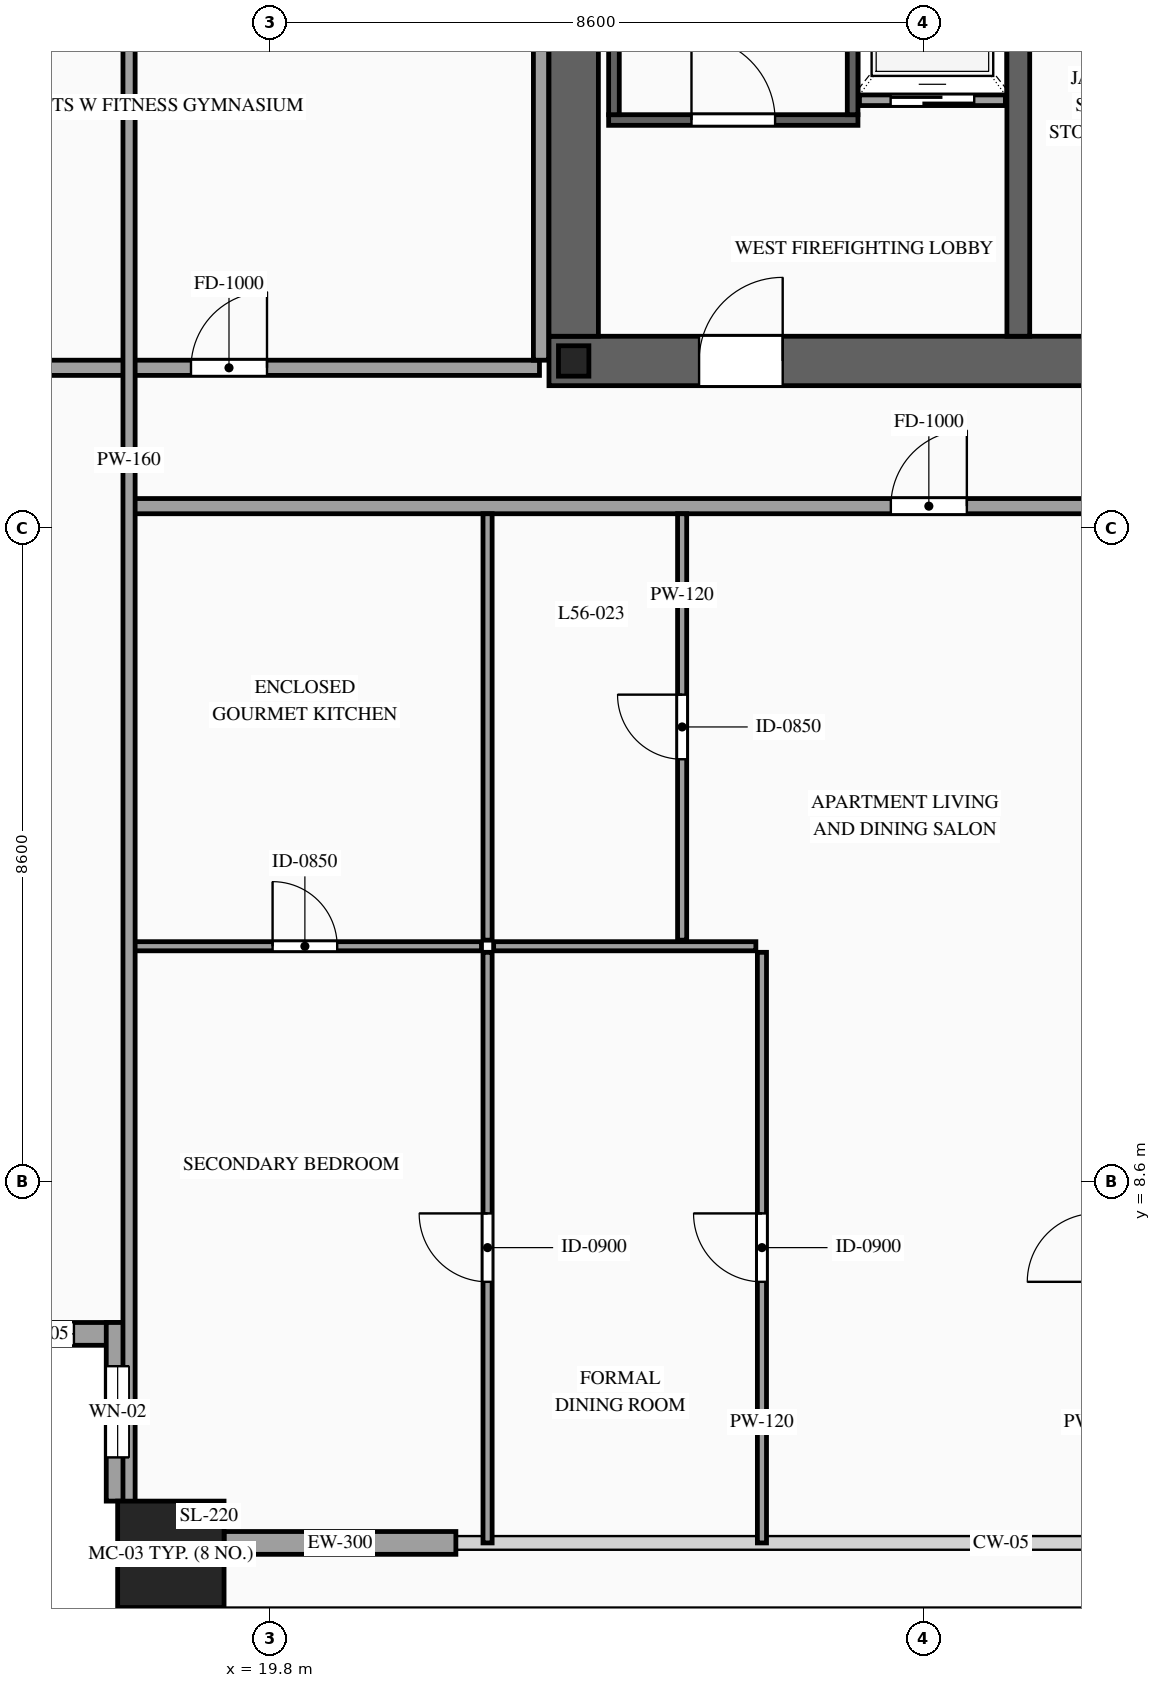
"""IFC4 building model, lengths in metres.
Left out: names, types, materials, properties, quantities, classifications, styles, units other than length and angle.
Written with IfcOpenShell. Run it as: python <this file> out.ifc"""

import sys

from ifc_helpers import new_model, si_unit, direction, frame, frame_2d, origin, origin_2d, place, context, subcontext, project, spatial, rectangle, hollow_rectangle, i_section, extrude, source, transform, mapped, element, fill, save


model = new_model("IFC4")
c1 = context("Model", 3, precision=1e-05, world=origin(), true_north=direction((0.0, 1.0)))
c2 = subcontext(c1, "Body", "Model", "MODEL_VIEW")
j1 = project(units=[si_unit("LENGTHUNIT", "METRE"), si_unit("PLANEANGLEUNIT", "RADIAN")], contexts=[c1])
p1 = place(None, origin())
s1 = spatial("IfcSite", under=j1, at=p1, CompositionType="ELEMENT")
p2 = place(p1, origin())
s2 = spatial("IfcBuilding", under=s1, at=p2, CompositionType="ELEMENT")
p3 = place(p2, frame((0.0, 0.0, 212.5)))
s3 = spatial("IfcBuildingStorey", under=s2, at=p3, CompositionType="ELEMENT", Elevation=212.5)
p4 = place(p3, frame((23.475, 19.4, 0.0), z_axis=(0.0, 0.0, 1.0), x_axis=(1.0, 0.0, 0.0)))
e1 = element("IfcWall", 1, at=p4, inside=s3, PredefinedType="SHEAR", context=c2, shape_type="SweptSolid", body=[
    extrude(rectangle(XDim=27.05, YDim=0.65, at=frame_2d((13.525, 0.0))), origin(), (0.0, 0.0, 1.0), 3.5),
])
p5 = place(p4, frame((1.975, 0.0, 0.0)))
e2 = element("IfcOpeningElement", 2, at=p5, cuts=e1, PredefinedType="OPENING", context=c2, shape_type="SweptSolid", body=[
    extrude(rectangle(XDim=1.1, YDim=2.2, at=frame_2d((0.55, 1.1))), frame((0.0, 0.34, 0.0), z_axis=(0.0, -1.0, 0.0), x_axis=(1.0, 0.0, 0.0)), (0.0, 0.0, 1.0), 0.68),
])
p6 = place(p4, frame((9.875, 0.0, 0.0)))
e3 = element("IfcOpeningElement", 3, at=p6, cuts=e1, PredefinedType="OPENING", context=c2, shape_type="SweptSolid", body=[
    extrude(rectangle(XDim=1.1, YDim=2.2, at=frame_2d((0.55, 1.1))), frame((0.0, 0.34, 0.0), z_axis=(0.0, -1.0, 0.0), x_axis=(1.0, 0.0, 0.0)), (0.0, 0.0, 1.0), 0.68),
])
p7 = place(p4, frame((23.075, 0.0, 0.0)))
e4 = element("IfcOpeningElement", 4, at=p7, cuts=e1, PredefinedType="OPENING", context=c2, shape_type="SweptSolid", body=[
    extrude(rectangle(XDim=1.1, YDim=2.2, at=frame_2d((0.55, 1.1))), frame((0.0, 0.34, 0.0), z_axis=(0.0, -1.0, 0.0), x_axis=(1.0, 0.0, 0.0)), (0.0, 0.0, 1.0), 0.68),
])
p8 = place(p4, frame((19.695, 0.0, 0.0)))
e5 = element("IfcOpeningElement", 5, at=p8, cuts=e1, PredefinedType="OPENING", context=c2, shape_type="SweptSolid", body=[
    extrude(rectangle(XDim=0.9, YDim=2.15, at=frame_2d((0.45, 1.075))), frame((0.0, 0.34, 0.0), z_axis=(0.0, -1.0, 0.0), x_axis=(1.0, 0.0, 0.0)), (0.0, 0.0, 1.0), 0.68),
])
p9 = place(p4, frame((18.255, 0.0, 0.0)))
e6 = element("IfcOpeningElement", 6, at=p9, cuts=e1, PredefinedType="OPENING", context=c2, shape_type="SweptSolid", body=[
    extrude(rectangle(XDim=0.9, YDim=2.15, at=frame_2d((0.45, 1.075))), frame((0.0, 0.34, 0.0), z_axis=(0.0, -1.0, 0.0), x_axis=(1.0, 0.0, 0.0)), (0.0, 0.0, 1.0), 0.68),
])
m1 = source(origin(), c2, "Body", "SweptSolid", [
    extrude(rectangle(XDim=12.15, YDim=0.65, at=frame_2d((6.075, 0.0))), origin(), (0.0, 0.0, 1.0), 3.5),
])
p10 = place(p3, frame((23.8, 19.725, 0.0), z_axis=(0.0, 0.0, 1.0), x_axis=(0.0, 1.0, 0.0)))
e7 = element("IfcWall", 7, at=p10, inside=s3, PredefinedType="SHEAR", context=c2, shape_type="MappedRepresentation", body=[
    mapped(m1, transform((0.0, 0.0, 0.0), scale=1.0)),
])
m2 = source(origin(), c2, "Body", "SweptSolid", [
    extrude(rectangle(XDim=12.15, YDim=0.3, at=frame_2d((6.075, 0.0))), origin(), (0.0, 0.0, 1.0), 3.5),
])
p11 = place(p3, frame((29.65, 19.725, 0.0), z_axis=(0.0, 0.0, 1.0), x_axis=(0.0, 1.0, 0.0)))
e8 = element("IfcWall", 8, at=p11, inside=s3, PredefinedType="SOLIDWALL", context=c2, shape_type="MappedRepresentation", body=[
    mapped(m2, transform((0.0, 0.0, 0.0), scale=1.0)),
])
m3 = source(origin(), c2, "Body", "SweptSolid", [
    extrude(i_section(OverallWidth=0.4, OverallDepth=0.4, WebThickness=0.013, FlangeThickness=0.021, at=origin_2d()), origin(), (0.0, 0.0, 1.0), 3.5),
])
p12 = place(p3, frame((23.8, 19.4, 0.0), z_axis=(0.0, 0.0, 1.0), x_axis=(1.0, 0.0, 0.0)))
e9 = element("IfcColumn", 9, at=p12, inside=s3, PredefinedType="COLUMN", context=c2, shape_type="MappedRepresentation", body=[
    mapped(m3, transform((0.0, 0.0, 0.0), scale=1.0)),
])
m4 = source(origin(), c2, "Body", "SweptSolid", [
    extrude(hollow_rectangle(XDim=1.4, YDim=1.4, WallThickness=0.06, at=origin_2d()), origin(), (0.0, 0.0, 1.0), 3.5),
])
p13 = place(p3, frame((18.5, 3.7, 0.0), z_axis=(0.0, 0.0, 1.0), x_axis=(1.0, 0.0, 0.0)))
e10 = element("IfcColumn", 10, at=p13, inside=s3, PredefinedType="COLUMN", context=c2, shape_type="MappedRepresentation", body=[
    mapped(m4, transform((0.0, 0.0, 0.0), scale=1.0)),
])
p14 = place(p3, frame((15.6, 6.6, 0.0), z_axis=(0.0, 0.0, 1.0), x_axis=(1.0, 0.0, 0.0)))
e11 = element("IfcWall", 11, at=p14, inside=s3, PredefinedType="SOLIDWALL", context=c2, shape_type="SweptSolid", body=[
    extrude(rectangle(XDim=2.35, YDim=0.3, at=frame_2d((1.175, 0.0))), origin(), (0.0, 0.0, 1.0), 3.28),
])
p15 = place(p14, frame((0.725, 0.0, 0.85)))
e12 = element("IfcOpeningElement", 12, at=p15, cuts=e11, PredefinedType="OPENING", context=c2, shape_type="SweptSolid", body=[
    extrude(rectangle(XDim=0.9, YDim=1.5, at=frame_2d((0.45, 0.75))), frame((0.0, 0.165, 0.0), z_axis=(0.0, -1.0, 0.0), x_axis=(1.0, 0.0, 0.0)), (0.0, 0.0, 1.0), 0.33),
])
p16 = place(p3, frame((17.8, 6.75, 0.0), z_axis=(0.0, 0.0, 1.0), x_axis=(0.0, -1.0, 0.0)))
e13 = element("IfcWall", 13, at=p16, inside=s3, PredefinedType="SOLIDWALL", context=c2, shape_type="SweptSolid", body=[
    extrude(rectangle(XDim=2.35, YDim=0.3, at=frame_2d((1.175, 0.0))), origin(), (0.0, 0.0, 1.0), 3.28),
])
p17 = place(p16, frame((0.575, 0.0, 0.85)))
e14 = element("IfcOpeningElement", 14, at=p17, cuts=e13, PredefinedType="OPENING", context=c2, shape_type="SweptSolid", body=[
    extrude(rectangle(XDim=1.2, YDim=2.1, at=frame_2d((0.6, 1.05))), frame((0.0, 0.165, 0.0), z_axis=(0.0, -1.0, 0.0), x_axis=(1.0, 0.0, 0.0)), (0.0, 0.0, 1.0), 0.33),
])
m5 = source(origin(), c2, "Body", "SweptSolid", [
    extrude(rectangle(XDim=3.05, YDim=0.3, at=frame_2d((1.525, 0.0))), origin(), (0.0, 0.0, 1.0), 2.835),
])
p18 = place(p3, frame((19.2, 3.85, 0.0), z_axis=(0.0, 0.0, 1.0), x_axis=(1.0, 0.0, 0.0)))
e15 = element("IfcWall", 15, at=p18, inside=s3, PredefinedType="SOLIDWALL", context=c2, shape_type="MappedRepresentation", body=[
    mapped(m5, transform((0.0, 0.0, 0.0), scale=1.0)),
])
p19 = place(p3, frame((27.56, 22.83, 0.0), z_axis=(0.0, 0.0, 1.0), x_axis=(1.0, 0.0, 0.0)))
e16 = element("IfcWall", 16, at=p19, inside=s3, PredefinedType="SOLIDWALL", context=c2, shape_type="SweptSolid", body=[
    extrude(rectangle(XDim=1.92, YDim=0.14, at=frame_2d((0.96, 0.0))), origin(), (0.0, 0.0, 1.0), 3.28),
])
p20 = place(p19, frame((0.41, 0.0, 0.0)))
e17 = element("IfcOpeningElement", 17, at=p20, cuts=e16, PredefinedType="OPENING", context=c2, shape_type="SweptSolid", body=[
    extrude(rectangle(XDim=1.1, YDim=2.2, at=frame_2d((0.55, 1.1))), frame((0.0, 0.085, 0.0), z_axis=(0.0, -1.0, 0.0), x_axis=(1.0, 0.0, 0.0)), (0.0, 0.0, 1.0), 0.17),
])
p21 = place(p3, frame((24.26, 22.57, 0.0), z_axis=(0.0, 0.0, 1.0), x_axis=(1.0, 0.0, 0.0)))
e18 = element("IfcWall", 18, at=p21, inside=s3, PredefinedType="SOLIDWALL", context=c2, shape_type="SweptSolid", body=[
    extrude(rectangle(XDim=3.28, YDim=0.14, at=frame_2d((1.64, 0.0))), origin(), (0.0, 0.0, 1.0), 3.28),
])
p22 = place(p21, frame((1.09, 0.0, 0.0)))
e19 = element("IfcOpeningElement", 19, at=p22, cuts=e18, PredefinedType="OPENING", context=c2, shape_type="SweptSolid", body=[
    extrude(rectangle(XDim=1.1, YDim=2.2, at=frame_2d((0.55, 1.1))), frame((0.0, 0.085, 0.0), z_axis=(0.0, -1.0, 0.0), x_axis=(1.0, 0.0, 0.0)), (0.0, 0.0, 1.0), 0.17),
])
m6 = source(origin(), c2, "Body", "SweptSolid", [
    extrude(rectangle(XDim=8.94, YDim=0.14, at=frame_2d((4.47, 0.0))), origin(), (0.0, 0.0, 1.0), 3.28),
])
for number, where, z_axis, x_axis in (
    (20, (24.33, 22.64, 0.0), (0.0, 0.0, 1.0), (0.0, 1.0, 0.0)),
    (21, (27.47, 22.64, 0.0), (0.0, 0.0, 1.0), (0.0, 1.0, 0.0)),
):
    element("IfcWall", number, at=place(p3, frame(where, z_axis=z_axis, x_axis=x_axis)), inside=s3, PredefinedType="SOLIDWALL", context=c2, shape_type="MappedRepresentation", body=[
        mapped(m6, transform((0.0, 0.0, 0.0), scale=1.0)),
    ])
p23 = place(p3, frame((17.94, 17.49, 0.0), z_axis=(0.0, 0.0, 1.0), x_axis=(1.0, 0.0, 0.0)))
e22 = element("IfcWall", 22, at=p23, inside=s3, PredefinedType="PARTITIONING", context=c2, shape_type="SweptSolid", body=[
    extrude(rectangle(XDim=17.455, YDim=0.2, at=frame_2d((8.728, 0.0))), origin(), (0.0, 0.0, 1.0), 3.28),
])
p24 = place(p23, frame((10.033, 0.0, 0.0)))
e23 = element("IfcOpeningElement", 23, at=p24, cuts=e22, PredefinedType="OPENING", context=c2, shape_type="SweptSolid", body=[
    extrude(rectangle(XDim=1.0, YDim=2.2, at=frame_2d((0.5, 1.1))), frame((0.0, 0.115, 0.0), z_axis=(0.0, -1.0, 0.0), x_axis=(1.0, 0.0, 0.0)), (0.0, 0.0, 1.0), 0.23),
])
p25 = place(p3, frame((17.94, 11.7, 0.0), z_axis=(0.0, 0.0, 1.0), x_axis=(1.0, 0.0, 0.0)))
e24 = element("IfcWall", 24, at=p25, inside=s3, PredefinedType="PARTITIONING", context=c2, shape_type="SweptSolid", body=[
    extrude(rectangle(XDim=4.647, YDim=0.12, at=frame_2d((2.323, 0.0))), origin(), (0.0, 0.0, 1.0), 3.28),
])
p26 = place(p25, frame((1.898, 0.0, 0.0)))
e25 = element("IfcOpeningElement", 25, at=p26, cuts=e24, PredefinedType="OPENING", context=c2, shape_type="SweptSolid", body=[
    extrude(rectangle(XDim=0.85, YDim=2.1, at=frame_2d((0.425, 1.05))), frame((0.0, 0.075, 0.0), z_axis=(0.0, -1.0, 0.0), x_axis=(1.0, 0.0, 0.0)), (0.0, 0.0, 1.0), 0.15),
])
m7 = source(origin(), c2, "Body", "SweptSolid", [
    extrude(rectangle(XDim=5.61, YDim=0.12, at=frame_2d((2.805, 0.0))), origin(), (0.0, 0.0, 1.0), 3.28),
])
p27 = place(p3, frame((22.667, 11.78, 0.0), z_axis=(0.0, 0.0, 1.0), x_axis=(0.0, 1.0, 0.0)))
e26 = element("IfcWall", 26, at=p27, inside=s3, PredefinedType="PARTITIONING", context=c2, shape_type="MappedRepresentation", body=[
    mapped(m7, transform((0.0, 0.0, 0.0), scale=1.0)),
])
p28 = place(p3, frame((25.227, 11.78, 0.0), z_axis=(0.0, 0.0, 1.0), x_axis=(0.0, 1.0, 0.0)))
e27 = element("IfcWall", 27, at=p28, inside=s3, PredefinedType="PARTITIONING", context=c2, shape_type="SweptSolid", body=[
    extrude(rectangle(XDim=5.61, YDim=0.12, at=frame_2d((2.805, 0.0))), origin(), (0.0, 0.0, 1.0), 3.28),
])
p29 = place(p28, frame((2.38, 0.0, 0.0)))
e28 = element("IfcOpeningElement", 28, at=p29, cuts=e27, PredefinedType="OPENING", context=c2, shape_type="SweptSolid", body=[
    extrude(rectangle(XDim=0.85, YDim=2.1, at=frame_2d((0.425, 1.05))), frame((0.0, 0.075, 0.0), z_axis=(0.0, -1.0, 0.0), x_axis=(1.0, 0.0, 0.0)), (0.0, 0.0, 1.0), 0.15),
])
p30 = place(p3, frame((22.667, 3.85, 0.0), z_axis=(0.0, 0.0, 1.0), x_axis=(0.0, 1.0, 0.0)))
e29 = element("IfcWall", 29, at=p30, inside=s3, PredefinedType="PARTITIONING", context=c2, shape_type="SweptSolid", body=[
    extrude(rectangle(XDim=7.77, YDim=0.12, at=frame_2d((3.885, 0.0))), origin(), (0.0, 0.0, 1.0), 3.28),
])
p31 = place(p30, frame((3.435, 0.0, 0.0)))
e30 = element("IfcOpeningElement", 30, at=p31, cuts=e29, PredefinedType="OPENING", context=c2, shape_type="SweptSolid", body=[
    extrude(rectangle(XDim=0.9, YDim=2.15, at=frame_2d((0.45, 1.075))), frame((0.0, 0.075, 0.0), z_axis=(0.0, -1.0, 0.0), x_axis=(1.0, 0.0, 0.0)), (0.0, 0.0, 1.0), 0.15),
])
m8 = source(origin(), c2, "Body", "SweptSolid", [
    extrude(rectangle(XDim=3.45, YDim=0.12, at=frame_2d((1.725, 0.0))), origin(), (0.0, 0.0, 1.0), 2.875),
])
p32 = place(p3, frame((22.747, 11.7, 0.0), z_axis=(0.0, 0.0, 1.0), x_axis=(1.0, 0.0, 0.0)))
e31 = element("IfcWall", 31, at=p32, inside=s3, PredefinedType="PARTITIONING", context=c2, shape_type="MappedRepresentation", body=[
    mapped(m8, transform((0.0, 0.0, 0.0), scale=1.0)),
])
p33 = place(p3, frame((26.277, 3.85, 0.0), z_axis=(0.0, 0.0, 1.0), x_axis=(0.0, 1.0, 0.0)))
e32 = element("IfcWall", 32, at=p33, inside=s3, PredefinedType="PARTITIONING", context=c2, shape_type="SweptSolid", body=[
    extrude(rectangle(XDim=7.77, YDim=0.12, at=frame_2d((3.885, 0.0))), origin(), (0.0, 0.0, 1.0), 3.28),
])
p34 = place(p33, frame((3.435, 0.0, 0.0)))
e33 = element("IfcOpeningElement", 33, at=p34, cuts=e32, PredefinedType="OPENING", context=c2, shape_type="SweptSolid", body=[
    extrude(rectangle(XDim=0.9, YDim=2.15, at=frame_2d((0.45, 1.075))), frame((0.0, 0.075, 0.0), z_axis=(0.0, -1.0, 0.0), x_axis=(1.0, 0.0, 0.0)), (0.0, 0.0, 1.0), 0.15),
])
p35 = place(p3, frame((15.05, 19.31, 0.0), z_axis=(0.0, 0.0, 1.0), x_axis=(1.0, 0.0, 0.0)))
e34 = element("IfcWall", 34, at=p35, inside=s3, PredefinedType="PARTITIONING", context=c2, shape_type="SweptSolid", body=[
    extrude(rectangle(XDim=8.3, YDim=0.2, at=frame_2d((4.15, 0.0))), origin(), (0.0, 0.0, 1.0), 2.775),
])
p36 = place(p35, frame((3.715, 0.0, 0.0)))
e35 = element("IfcOpeningElement", 35, at=p36, cuts=e34, PredefinedType="OPENING", context=c2, shape_type="SweptSolid", body=[
    extrude(rectangle(XDim=1.0, YDim=2.2, at=frame_2d((0.5, 1.1))), frame((0.0, 0.115, 0.0), z_axis=(0.0, -1.0, 0.0), x_axis=(1.0, 0.0, 0.0)), (0.0, 0.0, 1.0), 0.23),
])
m9 = source(origin(), c2, "Body", "SweptSolid", [
    extrude(rectangle(XDim=6.29, YDim=0.2, at=frame_2d((3.145, 0.0))), origin(), (0.0, 0.0, 1.0), 3.28),
])
p37 = place(p3, frame((23.37, 19.41, 0.0), z_axis=(0.0, 0.0, 1.0), x_axis=(0.0, 1.0, 0.0)))
e36 = element("IfcWall", 36, at=p37, inside=s3, PredefinedType="PARTITIONING", context=c2, shape_type="MappedRepresentation", body=[
    mapped(m9, transform((0.0, 0.0, 0.0), scale=1.0)),
])
m10 = source(origin(), c2, "Body", "SweptSolid", [
    extrude(rectangle(XDim=28.19, YDim=0.16, at=frame_2d((14.095, 0.0))), origin(), (0.0, 0.0, 1.0), 3.28),
])
p38 = place(p3, frame((17.95, 4.0, 0.0), z_axis=(0.0, 0.0, 1.0), x_axis=(0.0, 1.0, 0.0)))
e37 = element("IfcWall", 37, at=p38, inside=s3, PredefinedType="PARTITIONING", context=c2, shape_type="MappedRepresentation", body=[
    mapped(m10, transform((0.0, 0.0, 0.0), scale=1.0)),
])
m11 = source(origin(), c2, "Body", "SweptSolid", [
    extrude(rectangle(XDim=0.9, YDim=1.5, at=frame_2d((0.45, 0.75))), frame((0.0, 0.03, 0.0), z_axis=(0.0, -1.0, 0.0), x_axis=(1.0, 0.0, 0.0)), (0.0, 0.0, 1.0), 0.06),
])
p39 = place(p15, origin())
e38 = element("IfcWindow", 38, at=p39, inside=s3, PartitioningType="SINGLE_PANEL", PredefinedType="WINDOW", context=c2, shape_type="MappedRepresentation", body=[
    mapped(m11, transform((0.0, 0.0, 0.0), scale=1.0)),
])
fill(e12, e38)
m12 = source(origin(), c2, "Body", "SweptSolid", [
    extrude(rectangle(XDim=1.2, YDim=2.1, at=frame_2d((0.6, 1.05))), frame((0.0, 0.03, 0.0), z_axis=(0.0, -1.0, 0.0), x_axis=(1.0, 0.0, 0.0)), (0.0, 0.0, 1.0), 0.06),
])
p40 = place(p17, origin())
e39 = element("IfcWindow", 39, at=p40, inside=s3, PartitioningType="SINGLE_PANEL", PredefinedType="WINDOW", context=c2, shape_type="MappedRepresentation", body=[
    mapped(m12, transform((0.0, 0.0, 0.0), scale=1.0)),
])
fill(e14, e39)
m13 = source(origin(), c2, "Body", "SweptSolid", [
    extrude(rectangle(XDim=1.1, YDim=2.2, at=frame_2d((0.55, 1.1))), frame((0.0, 0.025, 0.0), z_axis=(0.0, -1.0, 0.0), x_axis=(1.0, 0.0, 0.0)), (0.0, 0.0, 1.0), 0.05),
])
p41 = place(p20, origin())
e40 = element("IfcDoor", 40, at=p41, inside=s3, OperationType="SLIDING_TO_LEFT", PredefinedType="DOOR", context=c2, shape_type="MappedRepresentation", body=[
    mapped(m13, transform((0.0, 0.0, 0.0), scale=1.0)),
])
fill(e17, e40)
m14 = source(origin(), c2, "Body", "SweptSolid", [
    extrude(rectangle(XDim=1.1, YDim=2.2, at=frame_2d((0.55, 1.1))), frame((0.0, 0.025, 0.0), z_axis=(0.0, -1.0, 0.0), x_axis=(1.0, 0.0, 0.0)), (0.0, 0.0, 1.0), 0.05),
])
p42 = place(p22, origin())
e41 = element("IfcDoor", 41, at=p42, inside=s3, OperationType="SINGLE_SWING_LEFT", PredefinedType="DOOR", context=c2, shape_type="MappedRepresentation", body=[
    mapped(m14, transform((0.0, 0.0, 0.0), scale=1.0)),
])
fill(e19, e41)
p43 = place(p5, origin())
e42 = element("IfcDoor", 42, at=p43, inside=s3, OperationType="SINGLE_SWING_RIGHT", PredefinedType="DOOR", context=c2, shape_type="MappedRepresentation", body=[
    mapped(m14, transform((0.0, 0.0, 0.0), scale=1.0)),
])
fill(e2, e42)
m15 = source(origin(), c2, "Body", "SweptSolid", [
    extrude(rectangle(XDim=1.0, YDim=2.2, at=frame_2d((0.5, 1.1))), frame((0.0, 0.025, 0.0), z_axis=(0.0, -1.0, 0.0), x_axis=(1.0, 0.0, 0.0)), (0.0, 0.0, 1.0), 0.05),
])
p44 = place(p24, origin())
e43 = element("IfcDoor", 43, at=p44, inside=s3, OperationType="SINGLE_SWING_RIGHT", PredefinedType="DOOR", context=c2, shape_type="MappedRepresentation", body=[
    mapped(m15, transform((0.0, 0.0, 0.0), scale=1.0)),
])
fill(e23, e43)
m16 = source(origin(), c2, "Body", "SweptSolid", [
    extrude(rectangle(XDim=0.85, YDim=2.1, at=frame_2d((0.425, 1.05))), frame((0.0, 0.025, 0.0), z_axis=(0.0, -1.0, 0.0), x_axis=(1.0, 0.0, 0.0)), (0.0, 0.0, 1.0), 0.05),
])
p45 = place(p26, origin())
e44 = element("IfcDoor", 44, at=p45, inside=s3, OperationType="SINGLE_SWING_LEFT", PredefinedType="DOOR", context=c2, shape_type="MappedRepresentation", body=[
    mapped(m16, transform((0.0, 0.0, 0.0), scale=1.0)),
])
fill(e25, e44)
p46 = place(p29, origin())
e45 = element("IfcDoor", 45, at=p46, inside=s3, OperationType="SINGLE_SWING_RIGHT", PredefinedType="DOOR", context=c2, shape_type="MappedRepresentation", body=[
    mapped(m16, transform((0.0, 0.0, 0.0), scale=1.0)),
])
fill(e28, e45)
m17 = source(origin(), c2, "Body", "SweptSolid", [
    extrude(rectangle(XDim=0.9, YDim=2.15, at=frame_2d((0.45, 1.075))), frame((0.0, 0.025, 0.0), z_axis=(0.0, -1.0, 0.0), x_axis=(1.0, 0.0, 0.0)), (0.0, 0.0, 1.0), 0.05),
])
p47 = place(p31, origin())
e46 = element("IfcDoor", 46, at=p47, inside=s3, OperationType="SINGLE_SWING_RIGHT", PredefinedType="DOOR", context=c2, shape_type="MappedRepresentation", body=[
    mapped(m17, transform((0.0, 0.0, 0.0), scale=1.0)),
])
fill(e30, e46)
p48 = place(p34, origin())
e47 = element("IfcDoor", 47, at=p48, inside=s3, OperationType="SINGLE_SWING_RIGHT", PredefinedType="DOOR", context=c2, shape_type="MappedRepresentation", body=[
    mapped(m17, transform((0.0, 0.0, 0.0), scale=1.0)),
])
fill(e33, e47)
p49 = place(p36, origin())
e48 = element("IfcDoor", 48, at=p49, inside=s3, OperationType="SINGLE_SWING_RIGHT", PredefinedType="DOOR", context=c2, shape_type="MappedRepresentation", body=[
    mapped(m15, transform((0.0, 0.0, 0.0), scale=1.0)),
])
fill(e35, e48)
save(model, sys.argv[1])
